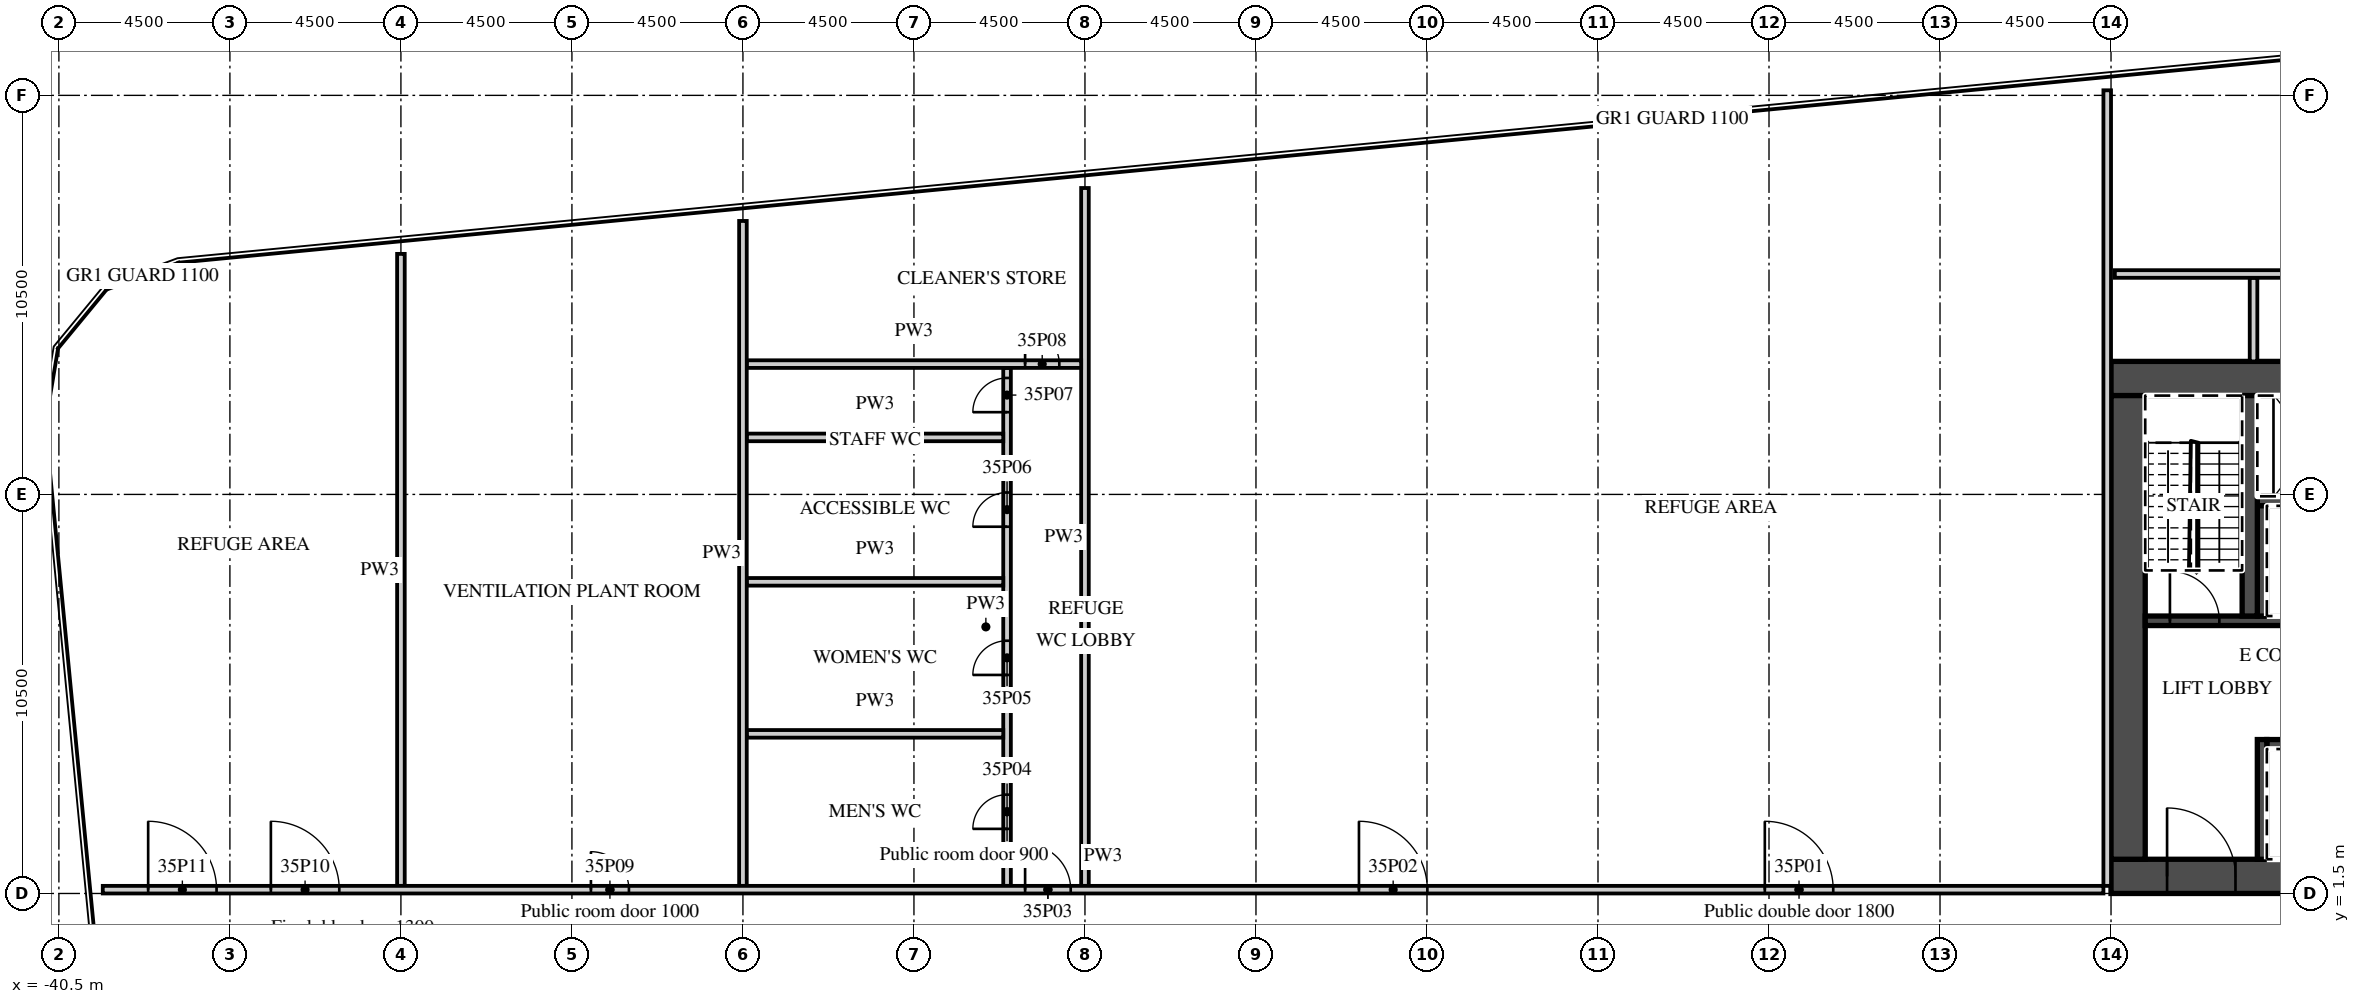
"""IFC4 building model, lengths in metres.
Left out: names, types, materials, properties, quantities, classifications, styles, units other than length and angle.
Written with IfcOpenShell. Run it as: python <this file> out.ifc"""

import sys

from ifc_helpers import new_model, si_unit, direction, frame, frame_2d, origin, place, context, subcontext, project, spatial, rectangle, extrude, element, fill, save


model = new_model("IFC4")
c1 = context("Model", 3, precision=1e-05, world=origin(), true_north=direction((0.0, 1.0)))
c2 = subcontext(c1, "Body", "Model", "MODEL_VIEW")
j1 = project(units=[si_unit("LENGTHUNIT", "METRE"), si_unit("PLANEANGLEUNIT", "RADIAN")], contexts=[c1])
p1 = place(None, origin())
s1 = spatial("IfcSite", under=j1, at=p1, CompositionType="ELEMENT")
p2 = place(p1, origin())
s2 = spatial("IfcBuilding", under=s1, at=p2, CompositionType="ELEMENT")
p3 = place(p2, frame((0.0, 0.0, 150.4)))
s3 = spatial("IfcBuildingStorey", under=s2, at=p3, CompositionType="ELEMENT", Elevation=150.4)
p4 = place(p3, frame((13.5, 1.95, 0.0), z_axis=(0.0, 0.0, 1.0), x_axis=(1.0, 0.0, 0.0)))
e1 = element("IfcWall", 1, at=p4, inside=s3, PredefinedType="SHEAR", context=c2, shape_type="SweptSolid", body=[
    extrude(rectangle(XDim=18.0, YDim=0.9, at=frame_2d((9.0, 0.0))), origin(), (0.0, 0.0, 1.0), 4.2),
])
p5 = place(p4, frame((1.475, 0.0, 0.0)))
e2 = element("IfcOpeningElement", 2, at=p5, cuts=e1, PredefinedType="OPENING", context=c2, shape_type="SweptSolid", body=[
    extrude(rectangle(XDim=1.8, YDim=2.1, at=frame_2d((0.9, 1.05))), frame((0.0, 0.46, 0.0), z_axis=(0.0, -1.0, 0.0), x_axis=(1.0, 0.0, 0.0)), (0.0, 0.0, 1.0), 0.92),
])
p6 = place(p3, frame((13.5, 15.05, 0.0), z_axis=(0.0, 0.0, 1.0), x_axis=(1.0, 0.0, 0.0)))
e3 = element("IfcWall", 3, at=p6, inside=s3, PredefinedType="SHEAR", context=c2, shape_type="SweptSolid", body=[
    extrude(rectangle(XDim=6.8, YDim=0.9, at=frame_2d((3.4, 0.0))), origin(), (0.0, 0.0, 1.0), 4.2),
])
p7 = place(p6, frame((4.725, 0.0, 0.0)))
e4 = element("IfcOpeningElement", 4, at=p7, cuts=e3, PredefinedType="OPENING", context=c2, shape_type="SweptSolid", body=[
    extrude(rectangle(XDim=1.2, YDim=2.1, at=frame_2d((0.6, 1.05))), frame((0.0, 0.46, 0.0), z_axis=(0.0, -1.0, 0.0), x_axis=(1.0, 0.0, 0.0)), (0.0, 0.0, 1.0), 0.92),
])
p8 = place(p3, frame((13.95, 2.4, 0.0), z_axis=(0.0, 0.0, 1.0), x_axis=(0.0, 1.0, 0.0)))
e5 = element("IfcWall", 5, at=p8, inside=s3, PredefinedType="SHEAR", context=c2, shape_type="SweptSolid", body=[
    extrude(rectangle(XDim=12.2, YDim=0.9, at=frame_2d((6.1, 0.0))), origin(), (0.0, 0.0, 1.0), 4.2),
])
p9 = place(p3, frame((17.6, 5.425, 0.0), z_axis=(0.0, 0.0, 1.0), x_axis=(1.0, 0.0, 0.0)))
e6 = element("IfcWall", 6, at=p9, inside=s3, PredefinedType="SHEAR", context=c2, shape_type="SweptSolid", body=[
    extrude(rectangle(XDim=13.0, YDim=0.25, at=frame_2d((6.5, 0.0))), origin(), (0.0, 0.0, 1.0), 4.2),
])
p10 = place(p3, frame((17.475, 2.4, 0.0), z_axis=(0.0, 0.0, 1.0), x_axis=(0.0, 1.0, 0.0)))
e7 = element("IfcWall", 7, at=p10, inside=s3, PredefinedType="SHEAR", context=c2, shape_type="SweptSolid", body=[
    extrude(rectangle(XDim=3.15, YDim=0.25, at=frame_2d((1.575, 0.0))), origin(), (0.0, 0.0, 1.0), 4.2),
])
p11 = place(p3, frame((14.4, 8.675, 0.0), z_axis=(0.0, 0.0, 1.0), x_axis=(1.0, 0.0, 0.0)))
e8 = element("IfcWall", 8, at=p11, inside=s3, PredefinedType="SHEAR", context=c2, shape_type="SweptSolid", body=[
    extrude(rectangle(XDim=16.2, YDim=0.25, at=frame_2d((8.1, 0.0))), origin(), (0.0, 0.0, 1.0), 4.2),
])
p12 = place(p11, frame((14.4, 0.0, 0.0)))
e9 = element("IfcOpeningElement", 9, at=p12, cuts=e8, PredefinedType="OPENING", context=c2, shape_type="SweptSolid", body=[
    extrude(rectangle(XDim=1.2, YDim=2.1, at=frame_2d((0.6, 1.05))), frame((0.0, 0.135, 0.0), z_axis=(0.0, -1.0, 0.0), x_axis=(1.0, 0.0, 0.0)), (0.0, 0.0, 1.0), 0.27),
])
p13 = place(p11, frame((11.75, 0.0, 0.0)))
e10 = element("IfcOpeningElement", 10, at=p13, cuts=e8, PredefinedType="OPENING", context=c2, shape_type="SweptSolid", body=[
    extrude(rectangle(XDim=1.2, YDim=2.1, at=frame_2d((0.6, 1.05))), frame((0.0, 0.135, 0.0), z_axis=(0.0, -1.0, 0.0), x_axis=(1.0, 0.0, 0.0)), (0.0, 0.0, 1.0), 0.27),
])
p14 = place(p11, frame((9.1, 0.0, 0.0)))
e11 = element("IfcOpeningElement", 11, at=p14, cuts=e8, PredefinedType="OPENING", context=c2, shape_type="SweptSolid", body=[
    extrude(rectangle(XDim=1.2, YDim=2.1, at=frame_2d((0.6, 1.05))), frame((0.0, 0.135, 0.0), z_axis=(0.0, -1.0, 0.0), x_axis=(1.0, 0.0, 0.0)), (0.0, 0.0, 1.0), 0.27),
])
p15 = place(p11, frame((0.65, 0.0, 0.0)))
e12 = element("IfcOpeningElement", 12, at=p15, cuts=e8, PredefinedType="OPENING", context=c2, shape_type="SweptSolid", body=[
    extrude(rectangle(XDim=1.3, YDim=2.1, at=frame_2d((0.65, 1.05))), frame((0.0, 0.135, 0.0), z_axis=(0.0, -1.0, 0.0), x_axis=(1.0, 0.0, 0.0)), (0.0, 0.0, 1.0), 0.27),
])
p16 = place(p3, frame((17.35, 11.825, 0.0), z_axis=(0.0, 0.0, 1.0), x_axis=(1.0, 0.0, 0.0)))
e13 = element("IfcWall", 13, at=p16, inside=s3, PredefinedType="SHEAR", context=c2, shape_type="SweptSolid", body=[
    extrude(rectangle(XDim=13.25, YDim=0.25, at=frame_2d((6.625, 0.0))), origin(), (0.0, 0.0, 1.0), 4.2),
])
p17 = place(p3, frame((17.475, 8.8, 0.0), z_axis=(0.0, 0.0, 1.0), x_axis=(0.0, 1.0, 0.0)))
e14 = element("IfcWall", 14, at=p17, inside=s3, PredefinedType="SHEAR", context=c2, shape_type="SweptSolid", body=[
    extrude(rectangle(XDim=2.9, YDim=0.25, at=frame_2d((1.45, 0.0))), origin(), (0.0, 0.0, 1.0), 4.2),
])
p18 = place(p3, frame((17.15, 8.8, 0.0), z_axis=(0.0, 0.0, 1.0), x_axis=(0.0, 1.0, 0.0)))
e15 = element("IfcWall", 15, at=p18, inside=s3, PredefinedType="SHEAR", context=c2, shape_type="SweptSolid", body=[
    extrude(rectangle(XDim=5.8, YDim=0.4, at=frame_2d((2.9, 0.0))), origin(), (0.0, 0.0, 1.0), 4.2),
])
p19 = place(p3, frame((17.25, 15.5, 0.0), z_axis=(0.0, 0.0, 1.0), x_axis=(0.0, 1.0, 0.0)))
e16 = element("IfcWall", 16, at=p19, inside=s3, PredefinedType="PARTITIONING", context=c2, shape_type="SweptSolid", body=[
    extrude(rectangle(XDim=2.2, YDim=0.2, at=frame_2d((1.1, 0.0))), origin(), (0.0, 0.0, 1.0), 4.2),
])
p20 = place(p3, frame((13.6, 17.8, 0.0), z_axis=(0.0, 0.0, 1.0), x_axis=(1.0, 0.0, 0.0)))
e17 = element("IfcWall", 17, at=p20, inside=s3, PredefinedType="PARTITIONING", context=c2, shape_type="SweptSolid", body=[
    extrude(rectangle(XDim=31.993, YDim=0.2, at=frame_2d((15.997, 0.0))), origin(), (0.0, 0.0, 1.0), 4.2),
])
p21 = place(p20, frame((17.812, 0.0, 0.0)))
e18 = element("IfcOpeningElement", 18, at=p21, cuts=e17, PredefinedType="OPENING", context=c2, shape_type="SweptSolid", body=[
    extrude(rectangle(XDim=0.9, YDim=2.1, at=frame_2d((0.45, 1.05))), frame((0.0, 0.11, 0.0), z_axis=(0.0, -1.0, 0.0), x_axis=(1.0, 0.0, 0.0)), (0.0, 0.0, 1.0), 0.22),
])
p22 = place(p20, frame((9.512, 0.0, 0.0)))
e19 = element("IfcOpeningElement", 19, at=p22, cuts=e17, PredefinedType="OPENING", context=c2, shape_type="SweptSolid", body=[
    extrude(rectangle(XDim=0.9, YDim=2.1, at=frame_2d((0.45, 1.05))), frame((0.0, 0.11, 0.0), z_axis=(0.0, -1.0, 0.0), x_axis=(1.0, 0.0, 0.0)), (0.0, 0.0, 1.0), 0.22),
])
p23 = place(p3, frame((-13.5, 1.7, 0.0), z_axis=(0.0, 0.0, 1.0), x_axis=(0.0, 1.0, 0.0)))
e20 = element("IfcWall", 20, at=p23, inside=s3, PredefinedType="PARTITIONING", context=c2, shape_type="SweptSolid", body=[
    extrude(rectangle(XDim=18.362, YDim=0.2, at=frame_2d((9.181, 0.0))), origin(), (0.0, 0.0, 1.0), 4.2),
])
p24 = place(p3, frame((-15.55, 1.7, 0.0), z_axis=(0.0, 0.0, 1.0), x_axis=(0.0, 1.0, 0.0)))
e21 = element("IfcWall", 21, at=p24, inside=s3, PredefinedType="PARTITIONING", context=c2, shape_type="SweptSolid", body=[
    extrude(rectangle(XDim=13.629, YDim=0.2, at=frame_2d((6.814, 0.0))), origin(), (0.0, 0.0, 1.0), 4.2),
])
p25 = place(p24, frame((1.5, 0.0, 0.0)))
e22 = element("IfcOpeningElement", 22, at=p25, cuts=e21, PredefinedType="OPENING", context=c2, shape_type="SweptSolid", body=[
    extrude(rectangle(XDim=0.9, YDim=2.1, at=frame_2d((0.45, 1.05))), frame((0.0, 0.11, 0.0), z_axis=(0.0, -1.0, 0.0), x_axis=(1.0, 0.0, 0.0)), (0.0, 0.0, 1.0), 0.22),
])
p26 = place(p24, frame((5.55, 0.0, 0.0)))
e23 = element("IfcOpeningElement", 23, at=p26, cuts=e21, PredefinedType="OPENING", context=c2, shape_type="SweptSolid", body=[
    extrude(rectangle(XDim=0.9, YDim=2.1, at=frame_2d((0.45, 1.05))), frame((0.0, 0.11, 0.0), z_axis=(0.0, -1.0, 0.0), x_axis=(1.0, 0.0, 0.0)), (0.0, 0.0, 1.0), 0.22),
])
p27 = place(p24, frame((9.45, 0.0, 0.0)))
e24 = element("IfcOpeningElement", 24, at=p27, cuts=e21, PredefinedType="OPENING", context=c2, shape_type="SweptSolid", body=[
    extrude(rectangle(XDim=0.9, YDim=2.1, at=frame_2d((0.45, 1.05))), frame((0.0, 0.11, 0.0), z_axis=(0.0, -1.0, 0.0), x_axis=(1.0, 0.0, 0.0)), (0.0, 0.0, 1.0), 0.22),
])
p28 = place(p24, frame((12.464, 0.0, 0.0)))
e25 = element("IfcOpeningElement", 25, at=p28, cuts=e21, PredefinedType="OPENING", context=c2, shape_type="SweptSolid", body=[
    extrude(rectangle(XDim=0.9, YDim=2.1, at=frame_2d((0.45, 1.05))), frame((0.0, 0.11, 0.0), z_axis=(0.0, -1.0, 0.0), x_axis=(1.0, 0.0, 0.0)), (0.0, 0.0, 1.0), 0.22),
])
for number, where, z_axis, x_axis in (
    (26, (-22.4, 5.7, 0.0), (0.0, 0.0, 1.0), (1.0, 0.0, 0.0)),
    (27, (-22.4, 9.7, 0.0), (0.0, 0.0, 1.0), (1.0, 0.0, 0.0)),
    (28, (-22.4, 13.5, 0.0), (0.0, 0.0, 1.0), (1.0, 0.0, 0.0)),
):
    element("IfcWall", number, at=place(p3, frame(where, z_axis=z_axis, x_axis=x_axis)), inside=s3, PredefinedType="PARTITIONING", context=c2, shape_type="SweptSolid", body=[
        extrude(rectangle(XDim=6.75, YDim=0.2, at=frame_2d((3.375, 0.0))), origin(), (0.0, 0.0, 1.0), 4.2),
    ])
p29 = place(p3, frame((-22.4, 15.429, 0.0), z_axis=(0.0, 0.0, 1.0), x_axis=(1.0, 0.0, 0.0)))
e29 = element("IfcWall", 29, at=p29, inside=s3, PredefinedType="PARTITIONING", context=c2, shape_type="SweptSolid", body=[
    extrude(rectangle(XDim=8.8, YDim=0.2, at=frame_2d((4.4, 0.0))), origin(), (0.0, 0.0, 1.0), 4.2),
])
p30 = place(p29, frame((7.325, 0.0, 0.0)))
e30 = element("IfcOpeningElement", 30, at=p30, cuts=e29, PredefinedType="OPENING", context=c2, shape_type="SweptSolid", body=[
    extrude(rectangle(XDim=0.9, YDim=2.1, at=frame_2d((0.45, 1.05))), frame((0.0, 0.11, 0.0), z_axis=(0.0, -1.0, 0.0), x_axis=(1.0, 0.0, 0.0)), (0.0, 0.0, 1.0), 0.22),
])
p31 = place(p3, frame((-22.5, 1.7, 0.0), z_axis=(0.0, 0.0, 1.0), x_axis=(0.0, 1.0, 0.0)))
e31 = element("IfcWall", 31, at=p31, inside=s3, PredefinedType="PARTITIONING", context=c2, shape_type="SweptSolid", body=[
    extrude(rectangle(XDim=17.496, YDim=0.2, at=frame_2d((8.748, 0.0))), origin(), (0.0, 0.0, 1.0), 4.2),
])
p32 = place(p3, frame((-31.5, 1.7, 0.0), z_axis=(0.0, 0.0, 1.0), x_axis=(0.0, 1.0, 0.0)))
e32 = element("IfcWall", 32, at=p32, inside=s3, PredefinedType="PARTITIONING", context=c2, shape_type="SweptSolid", body=[
    extrude(rectangle(XDim=16.629, YDim=0.2, at=frame_2d((8.314, 0.0))), origin(), (0.0, 0.0, 1.0), 4.2),
])
p33 = place(p3, frame((-39.345, 1.6, 0.0), z_axis=(0.0, 0.0, 1.0), x_axis=(1.0, 0.0, 0.0)))
e33 = element("IfcWall", 33, at=p33, inside=s3, PredefinedType="PARTITIONING", context=c2, shape_type="SweptSolid", body=[
    extrude(rectangle(XDim=52.646, YDim=0.2, at=frame_2d((26.323, 0.0))), origin(), (0.0, 0.0, 1.0), 4.2),
])
p34 = place(p33, frame((43.735, 0.0, 0.0)))
e34 = element("IfcOpeningElement", 34, at=p34, cuts=e33, PredefinedType="OPENING", context=c2, shape_type="SweptSolid", body=[
    extrude(rectangle(XDim=1.8, YDim=2.1, at=frame_2d((0.9, 1.05))), frame((0.0, 0.11, 0.0), z_axis=(0.0, -1.0, 0.0), x_axis=(1.0, 0.0, 0.0)), (0.0, 0.0, 1.0), 0.22),
])
p35 = place(p33, frame((33.055, 0.0, 0.0)))
e35 = element("IfcOpeningElement", 35, at=p35, cuts=e33, PredefinedType="OPENING", context=c2, shape_type="SweptSolid", body=[
    extrude(rectangle(XDim=1.8, YDim=2.1, at=frame_2d((0.9, 1.05))), frame((0.0, 0.11, 0.0), z_axis=(0.0, -1.0, 0.0), x_axis=(1.0, 0.0, 0.0)), (0.0, 0.0, 1.0), 0.22),
])
p36 = place(p33, frame((24.271, 0.0, 0.0)))
e36 = element("IfcOpeningElement", 36, at=p36, cuts=e33, PredefinedType="OPENING", context=c2, shape_type="SweptSolid", body=[
    extrude(rectangle(XDim=1.2, YDim=2.1, at=frame_2d((0.6, 1.05))), frame((0.0, 0.11, 0.0), z_axis=(0.0, -1.0, 0.0), x_axis=(1.0, 0.0, 0.0)), (0.0, 0.0, 1.0), 0.22),
])
p37 = place(p33, frame((12.845, 0.0, 0.0)))
e37 = element("IfcOpeningElement", 37, at=p37, cuts=e33, PredefinedType="OPENING", context=c2, shape_type="SweptSolid", body=[
    extrude(rectangle(XDim=1.0, YDim=2.1, at=frame_2d((0.5, 1.05))), frame((0.0, 0.11, 0.0), z_axis=(0.0, -1.0, 0.0), x_axis=(1.0, 0.0, 0.0)), (0.0, 0.0, 1.0), 0.22),
])
p38 = place(p33, frame((4.423, 0.0, 0.0)))
e38 = element("IfcOpeningElement", 38, at=p38, cuts=e33, PredefinedType="OPENING", context=c2, shape_type="SweptSolid", body=[
    extrude(rectangle(XDim=1.8, YDim=2.1, at=frame_2d((0.9, 1.05))), frame((0.0, 0.11, 0.0), z_axis=(0.0, -1.0, 0.0), x_axis=(1.0, 0.0, 0.0)), (0.0, 0.0, 1.0), 0.22),
])
p39 = place(p33, frame((1.194, 0.0, 0.0)))
e39 = element("IfcOpeningElement", 39, at=p39, cuts=e33, PredefinedType="OPENING", context=c2, shape_type="SweptSolid", body=[
    extrude(rectangle(XDim=1.8, YDim=2.1, at=frame_2d((0.9, 1.05))), frame((0.0, 0.11, 0.0), z_axis=(0.0, -1.0, 0.0), x_axis=(1.0, 0.0, 0.0)), (0.0, 0.0, 1.0), 0.22),
])
p40 = place(p3, frame((13.4, 1.7, 0.0), z_axis=(0.0, 0.0, 1.0), x_axis=(0.0, 1.0, 0.0)))
e40 = element("IfcWall", 40, at=p40, inside=s3, PredefinedType="PARTITIONING", context=c2, shape_type="SweptSolid", body=[
    extrude(rectangle(XDim=20.933, YDim=0.2, at=frame_2d((10.467, 0.0))), origin(), (0.0, 0.0, 1.0), 4.2),
])
p41 = place(p5, origin())
e41 = element("IfcDoor", 41, at=p41, inside=s3, OperationType="DOUBLE_DOOR_DOUBLE_SWING", PredefinedType="DOOR", context=c2, shape_type="SweptSolid", body=[
    extrude(rectangle(XDim=1.8, YDim=2.1, at=frame_2d((0.9, 1.05))), frame((0.0, 0.025, 0.0), z_axis=(0.0, -1.0, 0.0), x_axis=(1.0, 0.0, 0.0)), (0.0, 0.0, 1.0), 0.05),
])
fill(e2, e41)
p42 = place(p15, origin())
e42 = element("IfcDoor", 42, at=p42, inside=s3, OperationType="SINGLE_SWING_LEFT", PredefinedType="DOOR", context=c2, shape_type="SweptSolid", body=[
    extrude(rectangle(XDim=1.3, YDim=2.1, at=frame_2d((0.65, 1.05))), frame((0.0, 0.025, 0.0), z_axis=(0.0, -1.0, 0.0), x_axis=(1.0, 0.0, 0.0)), (0.0, 0.0, 1.0), 0.05),
])
fill(e12, e42)
p43 = place(p34, origin())
e43 = element("IfcDoor", 43, at=p43, inside=s3, OperationType="DOUBLE_DOOR_DOUBLE_SWING", PredefinedType="DOOR", context=c2, shape_type="SweptSolid", body=[
    extrude(rectangle(XDim=1.8, YDim=2.1, at=frame_2d((0.9, 1.05))), frame((0.0, 0.025, 0.0), z_axis=(0.0, -1.0, 0.0), x_axis=(1.0, 0.0, 0.0)), (0.0, 0.0, 1.0), 0.05),
])
fill(e34, e43)
p44 = place(p35, origin())
e44 = element("IfcDoor", 44, at=p44, inside=s3, OperationType="DOUBLE_DOOR_DOUBLE_SWING", PredefinedType="DOOR", context=c2, shape_type="SweptSolid", body=[
    extrude(rectangle(XDim=1.8, YDim=2.1, at=frame_2d((0.9, 1.05))), frame((0.0, 0.025, 0.0), z_axis=(0.0, -1.0, 0.0), x_axis=(1.0, 0.0, 0.0)), (0.0, 0.0, 1.0), 0.05),
])
fill(e35, e44)
p45 = place(p36, origin())
e45 = element("IfcDoor", 45, at=p45, inside=s3, OperationType="SINGLE_SWING_LEFT", PredefinedType="DOOR", context=c2, shape_type="SweptSolid", body=[
    extrude(rectangle(XDim=1.2, YDim=2.1, at=frame_2d((0.6, 1.05))), frame((0.0, 0.025, 0.0), z_axis=(0.0, -1.0, 0.0), x_axis=(1.0, 0.0, 0.0)), (0.0, 0.0, 1.0), 0.05),
])
fill(e36, e45)
p46 = place(p25, origin())
e46 = element("IfcDoor", 46, at=p46, inside=s3, OperationType="SINGLE_SWING_LEFT", PredefinedType="DOOR", context=c2, shape_type="SweptSolid", body=[
    extrude(rectangle(XDim=0.9, YDim=2.1, at=frame_2d((0.45, 1.05))), frame((0.0, 0.025, 0.0), z_axis=(0.0, -1.0, 0.0), x_axis=(1.0, 0.0, 0.0)), (0.0, 0.0, 1.0), 0.05),
])
fill(e22, e46)
p47 = place(p26, origin())
e47 = element("IfcDoor", 47, at=p47, inside=s3, OperationType="SINGLE_SWING_LEFT", PredefinedType="DOOR", context=c2, shape_type="SweptSolid", body=[
    extrude(rectangle(XDim=0.9, YDim=2.1, at=frame_2d((0.45, 1.05))), frame((0.0, 0.025, 0.0), z_axis=(0.0, -1.0, 0.0), x_axis=(1.0, 0.0, 0.0)), (0.0, 0.0, 1.0), 0.05),
])
fill(e23, e47)
p48 = place(p27, origin())
e48 = element("IfcDoor", 48, at=p48, inside=s3, OperationType="SINGLE_SWING_LEFT", PredefinedType="DOOR", context=c2, shape_type="SweptSolid", body=[
    extrude(rectangle(XDim=0.9, YDim=2.1, at=frame_2d((0.45, 1.05))), frame((0.0, 0.025, 0.0), z_axis=(0.0, -1.0, 0.0), x_axis=(1.0, 0.0, 0.0)), (0.0, 0.0, 1.0), 0.05),
])
fill(e24, e48)
p49 = place(p28, origin())
e49 = element("IfcDoor", 49, at=p49, inside=s3, OperationType="SINGLE_SWING_LEFT", PredefinedType="DOOR", context=c2, shape_type="SweptSolid", body=[
    extrude(rectangle(XDim=0.9, YDim=2.1, at=frame_2d((0.45, 1.05))), frame((0.0, 0.025, 0.0), z_axis=(0.0, -1.0, 0.0), x_axis=(1.0, 0.0, 0.0)), (0.0, 0.0, 1.0), 0.05),
])
fill(e25, e49)
p50 = place(p30, origin())
e50 = element("IfcDoor", 50, at=p50, inside=s3, OperationType="SINGLE_SWING_LEFT", PredefinedType="DOOR", context=c2, shape_type="SweptSolid", body=[
    extrude(rectangle(XDim=0.9, YDim=2.1, at=frame_2d((0.45, 1.05))), frame((0.0, 0.025, 0.0), z_axis=(0.0, -1.0, 0.0), x_axis=(1.0, 0.0, 0.0)), (0.0, 0.0, 1.0), 0.05),
])
fill(e30, e50)
p51 = place(p37, origin())
e51 = element("IfcDoor", 51, at=p51, inside=s3, OperationType="SINGLE_SWING_LEFT", PredefinedType="DOOR", context=c2, shape_type="SweptSolid", body=[
    extrude(rectangle(XDim=1.0, YDim=2.1, at=frame_2d((0.5, 1.05))), frame((0.0, 0.025, 0.0), z_axis=(0.0, -1.0, 0.0), x_axis=(1.0, 0.0, 0.0)), (0.0, 0.0, 1.0), 0.05),
])
fill(e37, e51)
p52 = place(p38, origin())
e52 = element("IfcDoor", 52, at=p52, inside=s3, OperationType="DOUBLE_DOOR_DOUBLE_SWING", PredefinedType="DOOR", context=c2, shape_type="SweptSolid", body=[
    extrude(rectangle(XDim=1.8, YDim=2.1, at=frame_2d((0.9, 1.05))), frame((0.0, 0.025, 0.0), z_axis=(0.0, -1.0, 0.0), x_axis=(1.0, 0.0, 0.0)), (0.0, 0.0, 1.0), 0.05),
])
fill(e38, e52)
p53 = place(p39, origin())
e53 = element("IfcDoor", 53, at=p53, inside=s3, OperationType="DOUBLE_DOOR_DOUBLE_SWING", PredefinedType="DOOR", context=c2, shape_type="SweptSolid", body=[
    extrude(rectangle(XDim=1.8, YDim=2.1, at=frame_2d((0.9, 1.05))), frame((0.0, 0.025, 0.0), z_axis=(0.0, -1.0, 0.0), x_axis=(1.0, 0.0, 0.0)), (0.0, 0.0, 1.0), 0.05),
])
fill(e39, e53)
save(model, sys.argv[1])
